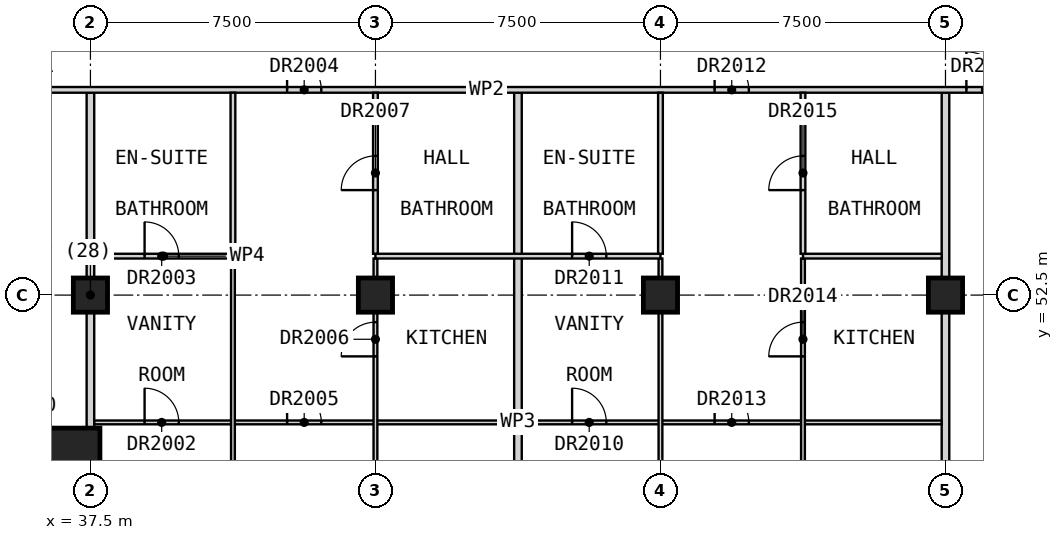
"""IFC4 building model, lengths in metres.
Left out: names, types, materials, properties, quantities, classifications, styles, units other than length and angle.
Written with IfcOpenShell. Run it as: python <this file> out.ifc"""

import sys

from ifc_helpers import new_model, si_unit, direction, frame, frame_2d, origin, origin_2d, place, context, subcontext, project, spatial, rectangle, extrude, element, fill, save


model = new_model("IFC4")
c1 = context("Model", 3, precision=1e-05, world=origin(), true_north=direction((0.0, 1.0)))
c2 = subcontext(c1, "Body", "Model", "MODEL_VIEW")
j1 = project(units=[si_unit("LENGTHUNIT", "METRE"), si_unit("PLANEANGLEUNIT", "RADIAN")], contexts=[c1])
p1 = place(None, origin())
s1 = spatial("IfcSite", under=j1, at=p1, CompositionType="ELEMENT")
p2 = place(p1, origin())
s2 = spatial("IfcBuilding", under=s1, at=p2, CompositionType="ELEMENT")
p3 = place(p2, frame((0.0, 0.0, 182.7)))
s3 = spatial("IfcBuildingStorey", under=s2, at=p3, CompositionType="ELEMENT", Elevation=182.7)
for number, where, z_axis, x_axis in (
    (1, (37.5, 52.5, 0.0), (0.0, 0.0, 1.0), (1.0, 0.0, 0.0)),
    (2, (45.0, 52.5, 0.0), (0.0, 0.0, 1.0), (1.0, 0.0, 0.0)),
    (3, (52.5, 52.5, 0.0), (0.0, 0.0, 1.0), (1.0, 0.0, 0.0)),
    (4, (60.0, 52.5, 0.0), (0.0, 0.0, 1.0), (1.0, 0.0, 0.0)),
):
    element("IfcColumn", number, at=place(p3, frame(where, z_axis=z_axis, x_axis=x_axis)), inside=s3, PredefinedType="COLUMN", context=c2, shape_type="SweptSolid", body=[
        extrude(rectangle(XDim=0.9, YDim=0.9, at=origin_2d()), origin(), (0.0, 0.0, 1.0), 3.5),
    ])
p4 = place(p3, frame((36.125, 47.375, 0.0), z_axis=(0.0, 0.0, 1.0), x_axis=(1.0, 0.0, 0.0)))
e5 = element("IfcColumn", 5, at=p4, inside=s3, PredefinedType="COLUMN", context=c2, shape_type="SweptSolid", body=[
    extrude(rectangle(XDim=3.25, YDim=3.25, at=origin_2d()), origin(), (0.0, 0.0, 1.0), 3.5),
])
p5 = place(p3, frame((37.5, 41.25, 0.0), z_axis=(0.0, 0.0, 1.0), x_axis=(0.0, 1.0, 0.0)))
e6 = element("IfcWall", 6, at=p5, inside=s3, PredefinedType="PARTITIONING", context=c2, shape_type="SweptSolid", body=[
    extrude(rectangle(XDim=16.575, YDim=0.2, at=frame_2d((8.288, 0.0))), origin(), (0.0, 0.0, 1.0), 2.75),
])
p6 = place(p3, frame((48.75, 42.06, 0.0), z_axis=(0.0, 0.0, 1.0), x_axis=(0.0, 1.0, 0.0)))
e7 = element("IfcWall", 7, at=p6, inside=s3, PredefinedType="PARTITIONING", context=c2, shape_type="SweptSolid", body=[
    extrude(rectangle(XDim=15.765, YDim=0.2, at=frame_2d((7.882, 0.0))), origin(), (0.0, 0.0, 1.0), 3.25),
])
p7 = place(p3, frame((60.0, 41.25, 0.0), z_axis=(0.0, 0.0, 1.0), x_axis=(0.0, 1.0, 0.0)))
e8 = element("IfcWall", 8, at=p7, inside=s3, PredefinedType="PARTITIONING", context=c2, shape_type="SweptSolid", body=[
    extrude(rectangle(XDim=16.575, YDim=0.2, at=frame_2d((8.288, 0.0))), origin(), (0.0, 0.0, 1.0), 3.25),
])
p8 = place(p3, frame((33.75, 57.9, 0.0), z_axis=(0.0, 0.0, 1.0), x_axis=(1.0, 0.0, 0.0)))
e9 = element("IfcWall", 9, at=p8, inside=s3, PredefinedType="PARTITIONING", context=c2, shape_type="SweptSolid", body=[
    extrude(rectangle(XDim=28.35, YDim=0.15, at=frame_2d((14.175, 0.0))), origin(), (0.0, 0.0, 1.0), 3.25),
])
p9 = place(p8, frame((1.375, 0.0, 0.0)))
e10 = element("IfcOpeningElement", 10, at=p9, cuts=e9, PredefinedType="OPENING", context=c2, shape_type="SweptSolid", body=[
    extrude(rectangle(XDim=1.0, YDim=2.1, at=frame_2d((0.5, 1.05))), frame((0.0, 0.085, 0.0), z_axis=(0.0, -1.0, 0.0), x_axis=(1.0, 0.0, 0.0)), (0.0, 0.0, 1.0), 0.17),
])
p10 = place(p8, frame((8.925, 0.0, 0.0)))
e11 = element("IfcOpeningElement", 11, at=p10, cuts=e9, PredefinedType="OPENING", context=c2, shape_type="SweptSolid", body=[
    extrude(rectangle(XDim=0.9, YDim=2.1, at=frame_2d((0.45, 1.05))), frame((0.0, 0.085, 0.0), z_axis=(0.0, -1.0, 0.0), x_axis=(1.0, 0.0, 0.0)), (0.0, 0.0, 1.0), 0.17),
])
p11 = place(p8, frame((20.175, 0.0, 0.0)))
e12 = element("IfcOpeningElement", 12, at=p11, cuts=e9, PredefinedType="OPENING", context=c2, shape_type="SweptSolid", body=[
    extrude(rectangle(XDim=0.9, YDim=2.1, at=frame_2d((0.45, 1.05))), frame((0.0, 0.085, 0.0), z_axis=(0.0, -1.0, 0.0), x_axis=(1.0, 0.0, 0.0)), (0.0, 0.0, 1.0), 0.17),
])
p12 = place(p8, frame((26.8, 0.0, 0.0)))
e13 = element("IfcOpeningElement", 13, at=p12, cuts=e9, PredefinedType="OPENING", context=c2, shape_type="SweptSolid", body=[
    extrude(rectangle(XDim=1.0, YDim=2.1, at=frame_2d((0.5, 1.05))), frame((0.0, 0.085, 0.0), z_axis=(0.0, -1.0, 0.0), x_axis=(1.0, 0.0, 0.0)), (0.0, 0.0, 1.0), 0.17),
])
p13 = place(p3, frame((37.6, 49.15, 0.0), z_axis=(0.0, 0.0, 1.0), x_axis=(1.0, 0.0, 0.0)))
e14 = element("IfcWall", 14, at=p13, inside=s3, PredefinedType="PARTITIONING", context=c2, shape_type="SweptSolid", body=[
    extrude(rectangle(XDim=22.3, YDim=0.1, at=frame_2d((11.15, 0.0))), origin(), (0.0, 0.0, 1.0), 3.25),
])
p14 = place(p13, frame((1.325, 0.0, 0.0)))
e15 = element("IfcOpeningElement", 15, at=p14, cuts=e14, PredefinedType="OPENING", context=c2, shape_type="SweptSolid", body=[
    extrude(rectangle(XDim=0.9, YDim=2.1, at=frame_2d((0.45, 1.05))), frame((0.0, 0.06, 0.0), z_axis=(0.0, -1.0, 0.0), x_axis=(1.0, 0.0, 0.0)), (0.0, 0.0, 1.0), 0.12),
])
p15 = place(p13, frame((5.075, 0.0, 0.0)))
e16 = element("IfcOpeningElement", 16, at=p15, cuts=e14, PredefinedType="OPENING", context=c2, shape_type="SweptSolid", body=[
    extrude(rectangle(XDim=0.9, YDim=2.1, at=frame_2d((0.45, 1.05))), frame((0.0, 0.06, 0.0), z_axis=(0.0, -1.0, 0.0), x_axis=(1.0, 0.0, 0.0)), (0.0, 0.0, 1.0), 0.12),
])
p16 = place(p13, frame((12.575, 0.0, 0.0)))
e17 = element("IfcOpeningElement", 17, at=p16, cuts=e14, PredefinedType="OPENING", context=c2, shape_type="SweptSolid", body=[
    extrude(rectangle(XDim=0.9, YDim=2.1, at=frame_2d((0.45, 1.05))), frame((0.0, 0.06, 0.0), z_axis=(0.0, -1.0, 0.0), x_axis=(1.0, 0.0, 0.0)), (0.0, 0.0, 1.0), 0.12),
])
p17 = place(p13, frame((16.325, 0.0, 0.0)))
e18 = element("IfcOpeningElement", 18, at=p17, cuts=e14, PredefinedType="OPENING", context=c2, shape_type="SweptSolid", body=[
    extrude(rectangle(XDim=0.9, YDim=2.1, at=frame_2d((0.45, 1.05))), frame((0.0, 0.06, 0.0), z_axis=(0.0, -1.0, 0.0), x_axis=(1.0, 0.0, 0.0)), (0.0, 0.0, 1.0), 0.12),
])
p18 = place(p3, frame((41.25, 42.06, 0.0), z_axis=(0.0, 0.0, 1.0), x_axis=(0.0, 1.0, 0.0)))
e19 = element("IfcWall", 19, at=p18, inside=s3, PredefinedType="PARTITIONING", context=c2, shape_type="SweptSolid", body=[
    extrude(rectangle(XDim=11.402, YDim=0.1, at=frame_2d((5.701, 0.0))), origin(), (0.0, 0.0, 1.0), 3.25),
])
p19 = place(p18, frame((2.69, 0.0, 0.0)))
e20 = element("IfcOpeningElement", 20, at=p19, cuts=e19, PredefinedType="OPENING", context=c2, shape_type="SweptSolid", body=[
    extrude(rectangle(XDim=0.9, YDim=2.1, at=frame_2d((0.45, 1.05))), frame((0.0, 0.06, 0.0), z_axis=(0.0, -1.0, 0.0), x_axis=(1.0, 0.0, 0.0)), (0.0, 0.0, 1.0), 0.12),
])
p20 = place(p3, frame((45.0, 41.25, 0.0), z_axis=(0.0, 0.0, 1.0), x_axis=(0.0, 1.0, 0.0)))
e21 = element("IfcWall", 21, at=p20, inside=s3, PredefinedType="PARTITIONING", context=c2, shape_type="SweptSolid", body=[
    extrude(rectangle(XDim=12.212, YDim=0.1, at=frame_2d((6.106, 0.0))), origin(), (0.0, 0.0, 1.0), 3.25),
])
p21 = place(p20, frame((9.637, 0.0, 0.0)))
e22 = element("IfcOpeningElement", 22, at=p21, cuts=e21, PredefinedType="OPENING", context=c2, shape_type="SweptSolid", body=[
    extrude(rectangle(XDim=0.9, YDim=2.1, at=frame_2d((0.45, 1.05))), frame((0.0, 0.06, 0.0), z_axis=(0.0, -1.0, 0.0), x_axis=(1.0, 0.0, 0.0)), (0.0, 0.0, 1.0), 0.12),
])
p22 = place(p20, frame((2.85, 0.0, 0.0)))
e23 = element("IfcOpeningElement", 23, at=p22, cuts=e21, PredefinedType="OPENING", context=c2, shape_type="SweptSolid", body=[
    extrude(rectangle(XDim=0.9, YDim=2.1, at=frame_2d((0.45, 1.05))), frame((0.0, 0.06, 0.0), z_axis=(0.0, -1.0, 0.0), x_axis=(1.0, 0.0, 0.0)), (0.0, 0.0, 1.0), 0.12),
])
p23 = place(p3, frame((52.5, 41.25, 0.0), z_axis=(0.0, 0.0, 1.0), x_axis=(0.0, 1.0, 0.0)))
e24 = element("IfcWall", 24, at=p23, inside=s3, PredefinedType="PARTITIONING", context=c2, shape_type="SweptSolid", body=[
    extrude(rectangle(XDim=12.212, YDim=0.1, at=frame_2d((6.106, 0.0))), origin(), (0.0, 0.0, 1.0), 3.25),
])
p24 = place(p23, frame((2.85, 0.0, 0.0)))
e25 = element("IfcOpeningElement", 25, at=p24, cuts=e24, PredefinedType="OPENING", context=c2, shape_type="SweptSolid", body=[
    extrude(rectangle(XDim=0.9, YDim=2.1, at=frame_2d((0.45, 1.05))), frame((0.0, 0.06, 0.0), z_axis=(0.0, -1.0, 0.0), x_axis=(1.0, 0.0, 0.0)), (0.0, 0.0, 1.0), 0.12),
])
p25 = place(p3, frame((56.25, 42.06, 0.0), z_axis=(0.0, 0.0, 1.0), x_axis=(0.0, 1.0, 0.0)))
e26 = element("IfcWall", 26, at=p25, inside=s3, PredefinedType="PARTITIONING", context=c2, shape_type="SweptSolid", body=[
    extrude(rectangle(XDim=11.402, YDim=0.1, at=frame_2d((5.701, 0.0))), origin(), (0.0, 0.0, 1.0), 3.25),
])
p26 = place(p25, frame((8.827, 0.0, 0.0)))
e27 = element("IfcOpeningElement", 27, at=p26, cuts=e26, PredefinedType="OPENING", context=c2, shape_type="SweptSolid", body=[
    extrude(rectangle(XDim=0.9, YDim=2.1, at=frame_2d((0.45, 1.05))), frame((0.0, 0.06, 0.0), z_axis=(0.0, -1.0, 0.0), x_axis=(1.0, 0.0, 0.0)), (0.0, 0.0, 1.0), 0.12),
])
p27 = place(p25, frame((2.69, 0.0, 0.0)))
e28 = element("IfcOpeningElement", 28, at=p27, cuts=e26, PredefinedType="OPENING", context=c2, shape_type="SweptSolid", body=[
    extrude(rectangle(XDim=0.9, YDim=2.1, at=frame_2d((0.45, 1.05))), frame((0.0, 0.06, 0.0), z_axis=(0.0, -1.0, 0.0), x_axis=(1.0, 0.0, 0.0)), (0.0, 0.0, 1.0), 0.12),
])
p28 = place(p3, frame((37.6, 53.525, 0.0), z_axis=(0.0, 0.0, 1.0), x_axis=(1.0, 0.0, 0.0)))
e29 = element("IfcWall", 29, at=p28, inside=s3, PredefinedType="PARTITIONING", context=c2, shape_type="SweptSolid", body=[
    extrude(rectangle(XDim=3.65, YDim=0.125, at=frame_2d((1.825, 0.0))), origin(), (0.0, 0.0, 1.0), 3.25),
])
p29 = place(p28, frame((1.325, 0.0, 0.0)))
e30 = element("IfcOpeningElement", 30, at=p29, cuts=e29, PredefinedType="OPENING", context=c2, shape_type="SweptSolid", body=[
    extrude(rectangle(XDim=0.9, YDim=2.1, at=frame_2d((0.45, 1.05))), frame((0.0, 0.073, 0.0), z_axis=(0.0, -1.0, 0.0), x_axis=(1.0, 0.0, 0.0)), (0.0, 0.0, 1.0), 0.145),
])
p30 = place(p3, frame((45.0, 53.525, 0.0), z_axis=(0.0, 0.0, 1.0), x_axis=(1.0, 0.0, 0.0)))
e31 = element("IfcWall", 31, at=p30, inside=s3, PredefinedType="PARTITIONING", context=c2, shape_type="SweptSolid", body=[
    extrude(rectangle(XDim=7.5, YDim=0.125, at=frame_2d((3.75, 0.0))), origin(), (0.0, 0.0, 1.0), 3.25),
])
p31 = place(p30, frame((5.175, 0.0, 0.0)))
e32 = element("IfcOpeningElement", 32, at=p31, cuts=e31, PredefinedType="OPENING", context=c2, shape_type="SweptSolid", body=[
    extrude(rectangle(XDim=0.9, YDim=2.1, at=frame_2d((0.45, 1.05))), frame((0.0, 0.073, 0.0), z_axis=(0.0, -1.0, 0.0), x_axis=(1.0, 0.0, 0.0)), (0.0, 0.0, 1.0), 0.145),
])
p32 = place(p3, frame((56.25, 53.525, 0.0), z_axis=(0.0, 0.0, 1.0), x_axis=(1.0, 0.0, 0.0)))
e33 = element("IfcWall", 33, at=p32, inside=s3, PredefinedType="PARTITIONING", context=c2, shape_type="SweptSolid", body=[
    extrude(rectangle(XDim=3.65, YDim=0.125, at=frame_2d((1.825, 0.0))), origin(), (0.0, 0.0, 1.0), 3.25),
])
p33 = place(p3, frame((41.25, 53.587, 0.0), z_axis=(0.0, 0.0, 1.0), x_axis=(0.0, 1.0, 0.0)))
e34 = element("IfcWall", 34, at=p33, inside=s3, PredefinedType="PARTITIONING", context=c2, shape_type="SweptSolid", body=[
    extrude(rectangle(XDim=4.238, YDim=0.125, at=frame_2d((2.119, 0.0))), origin(), (0.0, 0.0, 1.0), 3.25),
])
p34 = place(p3, frame((45.0, 53.587, 0.0), z_axis=(0.0, 0.0, 1.0), x_axis=(0.0, 1.0, 0.0)))
e35 = element("IfcWall", 35, at=p34, inside=s3, PredefinedType="PARTITIONING", context=c2, shape_type="SweptSolid", body=[
    extrude(rectangle(XDim=4.238, YDim=0.125, at=frame_2d((2.119, 0.0))), origin(), (0.0, 0.0, 1.0), 3.25),
])
p35 = place(p34, frame((1.675, 0.0, 0.0)))
e36 = element("IfcOpeningElement", 36, at=p35, cuts=e35, PredefinedType="OPENING", context=c2, shape_type="SweptSolid", body=[
    extrude(rectangle(XDim=0.9, YDim=2.1, at=frame_2d((0.45, 1.05))), frame((0.0, 0.073, 0.0), z_axis=(0.0, -1.0, 0.0), x_axis=(1.0, 0.0, 0.0)), (0.0, 0.0, 1.0), 0.145),
])
p36 = place(p3, frame((52.5, 53.587, 0.0), z_axis=(0.0, 0.0, 1.0), x_axis=(0.0, 1.0, 0.0)))
e37 = element("IfcWall", 37, at=p36, inside=s3, PredefinedType="PARTITIONING", context=c2, shape_type="SweptSolid", body=[
    extrude(rectangle(XDim=4.238, YDim=0.125, at=frame_2d((2.119, 0.0))), origin(), (0.0, 0.0, 1.0), 3.25),
])
p37 = place(p3, frame((56.25, 53.587, 0.0), z_axis=(0.0, 0.0, 1.0), x_axis=(0.0, 1.0, 0.0)))
e38 = element("IfcWall", 38, at=p37, inside=s3, PredefinedType="PARTITIONING", context=c2, shape_type="SweptSolid", body=[
    extrude(rectangle(XDim=4.238, YDim=0.125, at=frame_2d((2.119, 0.0))), origin(), (0.0, 0.0, 1.0), 3.25),
])
p38 = place(p37, frame((1.675, 0.0, 0.0)))
e39 = element("IfcOpeningElement", 39, at=p38, cuts=e38, PredefinedType="OPENING", context=c2, shape_type="SweptSolid", body=[
    extrude(rectangle(XDim=0.9, YDim=2.1, at=frame_2d((0.45, 1.05))), frame((0.0, 0.073, 0.0), z_axis=(0.0, -1.0, 0.0), x_axis=(1.0, 0.0, 0.0)), (0.0, 0.0, 1.0), 0.145),
])
p39 = place(p14, origin())
e40 = element("IfcDoor", 40, at=p39, inside=s3, OperationType="SINGLE_SWING_LEFT", PredefinedType="DOOR", context=c2, shape_type="SweptSolid", body=[
    extrude(rectangle(XDim=0.9, YDim=2.1, at=frame_2d((0.45, 1.05))), frame((0.0, 0.025, 0.0), z_axis=(0.0, -1.0, 0.0), x_axis=(1.0, 0.0, 0.0)), (0.0, 0.0, 1.0), 0.05),
])
fill(e15, e40)
p40 = place(p29, origin())
e41 = element("IfcDoor", 41, at=p40, inside=s3, OperationType="SINGLE_SWING_LEFT", PredefinedType="DOOR", context=c2, shape_type="SweptSolid", body=[
    extrude(rectangle(XDim=0.9, YDim=2.1, at=frame_2d((0.45, 1.05))), frame((0.0, 0.025, 0.0), z_axis=(0.0, -1.0, 0.0), x_axis=(1.0, 0.0, 0.0)), (0.0, 0.0, 1.0), 0.05),
])
fill(e30, e41)
p41 = place(p10, origin())
e42 = element("IfcDoor", 42, at=p41, inside=s3, OperationType="SINGLE_SWING_RIGHT", PredefinedType="DOOR", context=c2, shape_type="SweptSolid", body=[
    extrude(rectangle(XDim=0.9, YDim=2.1, at=frame_2d((0.45, 1.05))), frame((0.0, 0.025, 0.0), z_axis=(0.0, -1.0, 0.0), x_axis=(1.0, 0.0, 0.0)), (0.0, 0.0, 1.0), 0.05),
])
fill(e11, e42)
p42 = place(p15, origin())
e43 = element("IfcDoor", 43, at=p42, inside=s3, OperationType="SINGLE_SWING_LEFT", PredefinedType="DOOR", context=c2, shape_type="SweptSolid", body=[
    extrude(rectangle(XDim=0.9, YDim=2.1, at=frame_2d((0.45, 1.05))), frame((0.0, 0.025, 0.0), z_axis=(0.0, -1.0, 0.0), x_axis=(1.0, 0.0, 0.0)), (0.0, 0.0, 1.0), 0.05),
])
fill(e16, e43)
p43 = place(p21, origin())
e44 = element("IfcDoor", 44, at=p43, inside=s3, OperationType="SINGLE_SWING_RIGHT", PredefinedType="DOOR", context=c2, shape_type="SweptSolid", body=[
    extrude(rectangle(XDim=0.9, YDim=2.1, at=frame_2d((0.45, 1.05))), frame((0.0, 0.025, 0.0), z_axis=(0.0, -1.0, 0.0), x_axis=(1.0, 0.0, 0.0)), (0.0, 0.0, 1.0), 0.05),
])
fill(e22, e44)
p44 = place(p35, origin())
e45 = element("IfcDoor", 45, at=p44, inside=s3, OperationType="SINGLE_SWING_RIGHT", PredefinedType="DOOR", context=c2, shape_type="SweptSolid", body=[
    extrude(rectangle(XDim=0.9, YDim=2.1, at=frame_2d((0.45, 1.05))), frame((0.0, 0.025, 0.0), z_axis=(0.0, -1.0, 0.0), x_axis=(1.0, 0.0, 0.0)), (0.0, 0.0, 1.0), 0.05),
])
fill(e36, e45)
p45 = place(p16, origin())
e46 = element("IfcDoor", 46, at=p45, inside=s3, OperationType="SINGLE_SWING_LEFT", PredefinedType="DOOR", context=c2, shape_type="SweptSolid", body=[
    extrude(rectangle(XDim=0.9, YDim=2.1, at=frame_2d((0.45, 1.05))), frame((0.0, 0.025, 0.0), z_axis=(0.0, -1.0, 0.0), x_axis=(1.0, 0.0, 0.0)), (0.0, 0.0, 1.0), 0.05),
])
fill(e17, e46)
p46 = place(p31, origin())
e47 = element("IfcDoor", 47, at=p46, inside=s3, OperationType="SINGLE_SWING_LEFT", PredefinedType="DOOR", context=c2, shape_type="SweptSolid", body=[
    extrude(rectangle(XDim=0.9, YDim=2.1, at=frame_2d((0.45, 1.05))), frame((0.0, 0.025, 0.0), z_axis=(0.0, -1.0, 0.0), x_axis=(1.0, 0.0, 0.0)), (0.0, 0.0, 1.0), 0.05),
])
fill(e32, e47)
p47 = place(p11, origin())
e48 = element("IfcDoor", 48, at=p47, inside=s3, OperationType="SINGLE_SWING_RIGHT", PredefinedType="DOOR", context=c2, shape_type="SweptSolid", body=[
    extrude(rectangle(XDim=0.9, YDim=2.1, at=frame_2d((0.45, 1.05))), frame((0.0, 0.025, 0.0), z_axis=(0.0, -1.0, 0.0), x_axis=(1.0, 0.0, 0.0)), (0.0, 0.0, 1.0), 0.05),
])
fill(e12, e48)
p48 = place(p17, origin())
e49 = element("IfcDoor", 49, at=p48, inside=s3, OperationType="SINGLE_SWING_LEFT", PredefinedType="DOOR", context=c2, shape_type="SweptSolid", body=[
    extrude(rectangle(XDim=0.9, YDim=2.1, at=frame_2d((0.45, 1.05))), frame((0.0, 0.025, 0.0), z_axis=(0.0, -1.0, 0.0), x_axis=(1.0, 0.0, 0.0)), (0.0, 0.0, 1.0), 0.05),
])
fill(e18, e49)
p49 = place(p26, origin())
e50 = element("IfcDoor", 50, at=p49, inside=s3, OperationType="SINGLE_SWING_RIGHT", PredefinedType="DOOR", context=c2, shape_type="SweptSolid", body=[
    extrude(rectangle(XDim=0.9, YDim=2.1, at=frame_2d((0.45, 1.05))), frame((0.0, 0.025, 0.0), z_axis=(0.0, -1.0, 0.0), x_axis=(1.0, 0.0, 0.0)), (0.0, 0.0, 1.0), 0.05),
])
fill(e27, e50)
p50 = place(p38, origin())
e51 = element("IfcDoor", 51, at=p50, inside=s3, OperationType="SINGLE_SWING_RIGHT", PredefinedType="DOOR", context=c2, shape_type="SweptSolid", body=[
    extrude(rectangle(XDim=0.9, YDim=2.1, at=frame_2d((0.45, 1.05))), frame((0.0, 0.025, 0.0), z_axis=(0.0, -1.0, 0.0), x_axis=(1.0, 0.0, 0.0)), (0.0, 0.0, 1.0), 0.05),
])
fill(e39, e51)
p51 = place(p12, origin())
e52 = element("IfcDoor", 52, at=p51, inside=s3, OperationType="SINGLE_SWING_RIGHT", PredefinedType="DOOR", context=c2, shape_type="SweptSolid", body=[
    extrude(rectangle(XDim=1.0, YDim=2.1, at=frame_2d((0.5, 1.05))), frame((0.0, 0.025, 0.0), z_axis=(0.0, -1.0, 0.0), x_axis=(1.0, 0.0, 0.0)), (0.0, 0.0, 1.0), 0.05),
])
fill(e13, e52)
save(model, sys.argv[1])
